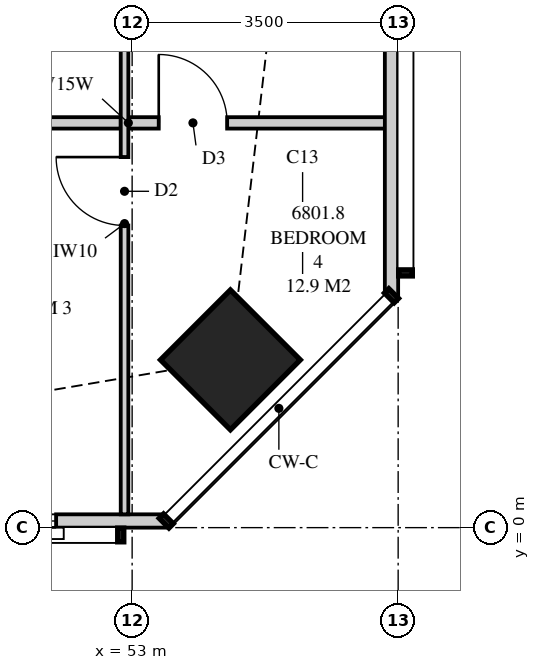
"""IFC4 building model, lengths in metres.
Left out: names, types, materials, properties, quantities, classifications, styles, units other than length and angle.
Written with IfcOpenShell. Run it as: python <this file> out.ifc"""

import sys

from ifc_helpers import new_model, si_unit, direction, frame, frame_2d, origin, origin_2d, place, context, subcontext, project, spatial, polyline, rectangle, outline, extrude, element, fill, save


model = new_model("IFC4")
c1 = context("Model", 3, precision=1e-05, world=origin(), true_north=direction((0.0, 1.0)))
c2 = subcontext(c1, "Body", "Model", "MODEL_VIEW")
j1 = project(units=[si_unit("LENGTHUNIT", "METRE"), si_unit("PLANEANGLEUNIT", "RADIAN")], contexts=[c1])
p1 = place(None, origin())
s1 = spatial("IfcSite", under=j1, at=p1, CompositionType="ELEMENT")
p2 = place(p1, origin())
s2 = spatial("IfcBuilding", under=s1, at=p2, CompositionType="ELEMENT")
p3 = place(p2, frame((0.0, 0.0, 249.45)))
s3 = spatial("IfcBuildingStorey", under=s2, at=p3, CompositionType="ELEMENT", Elevation=249.45)
p4 = place(p3, frame((54.293, 2.207, 0.0), z_axis=(0.0, 0.0, 1.0), x_axis=(0.707106781187, 0.707106781187, 0.0)))
e1 = element("IfcColumn", 1, at=p4, inside=s3, PredefinedType="COLUMN", context=c2, shape_type="SweptSolid", body=[
    extrude(rectangle(XDim=1.3, YDim=1.3, at=origin_2d()), origin(), (0.0, 0.0, 1.0), 3.5),
])
p5 = place(p3, frame((19.851, 0.087, 0.0), z_axis=(0.0, 0.0, 1.0), x_axis=(1.0, 0.0, 0.0)))
e2 = element("IfcWall", 2, at=p5, inside=s3, PredefinedType="SOLIDWALL", context=c2, shape_type="SweptSolid", body=[
    extrude(outline(polyline([(0.0, 0.0), (33.597, 0.0), (33.597, 3.26), (27.239, 3.26), (27.239, 2.3), (27.155, 2.3), (27.155, 3.26), (27.024, 3.26), (27.024, 2.3), (7.774, 2.3), (7.774, 3.26), (7.642, 3.26), (7.642, 2.3), (7.559, 2.3), (7.559, 3.26), (0.0, 3.26), (0.0, 0.0)])), frame((0.0, 0.087, 0.0), z_axis=(0.0, -1.0, 0.0), x_axis=(1.0, 0.0, 0.0)), (0.0, 0.0, 1.0), 0.175),
])
p6 = place(p5, frame((2.649, 0.0, 0.4)))
e3 = element("IfcOpeningElement", 3, at=p6, cuts=e2, PredefinedType="OPENING", context=c2, shape_type="SweptSolid", body=[
    extrude(rectangle(XDim=1.8, YDim=1.85, at=frame_2d((0.9, 0.925))), frame((0.0, 0.097, 0.0), z_axis=(0.0, -1.0, 0.0), x_axis=(1.0, 0.0, 0.0)), (0.0, 0.0, 1.0), 0.195),
])
p7 = place(p5, frame((8.625, 0.0, 0.4)))
e4 = element("IfcOpeningElement", 4, at=p7, cuts=e2, PredefinedType="OPENING", context=c2, shape_type="SweptSolid", body=[
    extrude(rectangle(XDim=1.8, YDim=1.85, at=frame_2d((0.9, 0.925))), frame((0.0, 0.097, 0.0), z_axis=(0.0, -1.0, 0.0), x_axis=(1.0, 0.0, 0.0)), (0.0, 0.0, 1.0), 0.195),
])
p8 = place(p5, frame((11.499, 0.0, 0.4)))
e5 = element("IfcOpeningElement", 5, at=p8, cuts=e2, PredefinedType="OPENING", context=c2, shape_type="SweptSolid", body=[
    extrude(rectangle(XDim=1.8, YDim=1.85, at=frame_2d((0.9, 0.925))), frame((0.0, 0.097, 0.0), z_axis=(0.0, -1.0, 0.0), x_axis=(1.0, 0.0, 0.0)), (0.0, 0.0, 1.0), 0.195),
])
p9 = place(p5, frame((14.359, 0.0, 0.0)))
e6 = element("IfcOpeningElement", 6, at=p9, cuts=e2, PredefinedType="OPENING", context=c2, shape_type="SweptSolid", body=[
    extrude(rectangle(XDim=1.8, YDim=2.25, at=frame_2d((0.9, 1.125))), frame((0.0, 0.097, 0.0), z_axis=(0.0, -1.0, 0.0), x_axis=(1.0, 0.0, 0.0)), (0.0, 0.0, 1.0), 0.195),
])
p10 = place(p5, frame((19.299, 0.0, 0.4)))
e7 = element("IfcOpeningElement", 7, at=p10, cuts=e2, PredefinedType="OPENING", context=c2, shape_type="SweptSolid", body=[
    extrude(rectangle(XDim=1.8, YDim=1.85, at=frame_2d((0.9, 0.925))), frame((0.0, 0.097, 0.0), z_axis=(0.0, -1.0, 0.0), x_axis=(1.0, 0.0, 0.0)), (0.0, 0.0, 1.0), 0.195),
])
p11 = place(p5, frame((23.674, 0.0, 0.4)))
e8 = element("IfcOpeningElement", 8, at=p11, cuts=e2, PredefinedType="OPENING", context=c2, shape_type="SweptSolid", body=[
    extrude(rectangle(XDim=2.4, YDim=1.85, at=frame_2d((1.2, 0.925))), frame((0.0, 0.097, 0.0), z_axis=(0.0, -1.0, 0.0), x_axis=(1.0, 0.0, 0.0)), (0.0, 0.0, 1.0), 0.195),
])
p12 = place(p5, frame((30.349, 0.0, 0.4)))
e9 = element("IfcOpeningElement", 9, at=p12, cuts=e2, PredefinedType="OPENING", context=c2, shape_type="SweptSolid", body=[
    extrude(rectangle(XDim=1.8, YDim=1.85, at=frame_2d((0.9, 0.925))), frame((0.0, 0.097, 0.0), z_axis=(0.0, -1.0, 0.0), x_axis=(1.0, 0.0, 0.0)), (0.0, 0.0, 1.0), 0.195),
])
p13 = place(p3, frame((56.413, 3.051, 0.0), z_axis=(0.0, 0.0, 1.0), x_axis=(0.0, 1.0, 0.0)))
e10 = element("IfcWall", 10, at=p13, inside=s3, PredefinedType="SOLIDWALL", context=c2, shape_type="SweptSolid", body=[
    extrude(outline(polyline([(0.0, 0.0), (27.897, 0.0), (27.897, 3.26), (22.157, 3.26), (22.157, 2.3), (22.092, 2.3), (22.092, 3.26), (21.949, 3.26), (21.949, 2.3), (9.949, 2.3), (9.949, 3.26), (9.858, 3.26), (9.858, 2.3), (9.688, 2.3), (9.688, 3.26), (0.0, 3.26), (0.0, 0.0)])), frame((0.0, 0.087, 0.0), z_axis=(0.0, -1.0, 0.0), x_axis=(1.0, 0.0, 0.0)), (0.0, 0.0, 1.0), 0.175),
])
p14 = place(p13, frame((10.831, 0.0, 0.4)))
e11 = element("IfcOpeningElement", 11, at=p14, cuts=e10, PredefinedType="OPENING", context=c2, shape_type="SweptSolid", body=[
    extrude(rectangle(XDim=2.4, YDim=1.85, at=frame_2d((1.2, 0.925))), frame((0.0, 0.097, 0.0), z_axis=(0.0, -1.0, 0.0), x_axis=(1.0, 0.0, 0.0)), (0.0, 0.0, 1.0), 0.195),
])
p15 = place(p13, frame((15.074, 0.0, 0.0)))
e12 = element("IfcOpeningElement", 12, at=p15, cuts=e10, PredefinedType="OPENING", context=c2, shape_type="SweptSolid", body=[
    extrude(rectangle(XDim=1.8, YDim=2.25, at=frame_2d((0.9, 1.125))), frame((0.0, 0.097, 0.0), z_axis=(0.0, -1.0, 0.0), x_axis=(1.0, 0.0, 0.0)), (0.0, 0.0, 1.0), 0.195),
])
p16 = place(p13, frame((18.699, 0.0, 0.4)))
e13 = element("IfcOpeningElement", 13, at=p16, cuts=e10, PredefinedType="OPENING", context=c2, shape_type="SweptSolid", body=[
    extrude(rectangle(XDim=2.4, YDim=1.85, at=frame_2d((1.2, 0.925))), frame((0.0, 0.097, 0.0), z_axis=(0.0, -1.0, 0.0), x_axis=(1.0, 0.0, 0.0)), (0.0, 0.0, 1.0), 0.195),
])
p17 = place(p3, frame((52.9, 0.175, 0.0), z_axis=(0.0, 0.0, 1.0), x_axis=(0.0, 1.0, 0.0)))
e14 = element("IfcWall", 14, at=p17, inside=s3, PredefinedType="PARTITIONING", context=c2, shape_type="SweptSolid", body=[
    extrude(outline(polyline([(0.0, 0.0), (7.65, 0.0), (7.65, 3.26), (2.668, 3.26), (2.668, 2.3), (0.924, 2.3), (0.924, 3.26), (0.0, 3.26), (0.0, 0.0)])), frame((0.0, 0.05, 0.0), z_axis=(0.0, -1.0, 0.0), x_axis=(1.0, 0.0, 0.0)), (0.0, 0.0, 1.0), 0.1),
])
p18 = place(p17, frame((3.8, 0.0, 0.0)))
e15 = element("IfcOpeningElement", 15, at=p18, cuts=e14, PredefinedType="OPENING", context=c2, shape_type="SweptSolid", body=[
    extrude(rectangle(XDim=0.9, YDim=2.1, at=frame_2d((0.45, 1.05))), frame((0.0, 0.06, 0.0), z_axis=(0.0, -1.0, 0.0), x_axis=(1.0, 0.0, 0.0)), (0.0, 0.0, 1.0), 0.12),
])
p19 = place(p3, frame((49.35, 5.325, 0.0), z_axis=(0.0, 0.0, 1.0), x_axis=(1.0, 0.0, 0.0)))
e16 = element("IfcWall", 16, at=p19, inside=s3, PredefinedType="PLUMBINGWALL", context=c2, shape_type="SweptSolid", body=[
    extrude(rectangle(XDim=3.5, YDim=0.15, at=frame_2d((1.75, 0.0))), origin(), (0.0, 0.0, 1.0), 3.26),
])
p20 = place(p3, frame((52.95, 5.325, 0.0), z_axis=(0.0, 0.0, 1.0), x_axis=(1.0, 0.0, 0.0)))
e17 = element("IfcWall", 17, at=p20, inside=s3, PredefinedType="PLUMBINGWALL", context=c2, shape_type="SweptSolid", body=[
    extrude(outline(polyline([(0.0, 0.0), (3.55, 0.0), (3.55, 3.26), (2.597, 3.26), (2.597, 2.3), (0.815, 2.3), (0.815, 3.26), (0.0, 3.26), (0.0, 0.0)])), frame((0.0, 0.075, 0.0), z_axis=(0.0, -1.0, 0.0), x_axis=(1.0, 0.0, 0.0)), (0.0, 0.0, 1.0), 0.15),
])
p21 = place(p20, frame((0.4, 0.0, 0.0)))
e18 = element("IfcOpeningElement", 18, at=p21, cuts=e17, PredefinedType="OPENING", context=c2, shape_type="SweptSolid", body=[
    extrude(rectangle(XDim=0.9, YDim=2.1, at=frame_2d((0.45, 1.05))), frame((0.0, 0.085, 0.0), z_axis=(0.0, -1.0, 0.0), x_axis=(1.0, 0.0, 0.0)), (0.0, 0.0, 1.0), 0.17),
])
p22 = place(p12, origin())
e19 = element("IfcWindow", 19, at=p22, inside=s3, PartitioningType="SINGLE_PANEL", PredefinedType="WINDOW", context=c2, shape_type="SweptSolid", body=[
    extrude(rectangle(XDim=1.8, YDim=1.85, at=frame_2d((0.9, 0.925))), frame((0.0, 0.03, 0.0), z_axis=(0.0, -1.0, 0.0), x_axis=(1.0, 0.0, 0.0)), (0.0, 0.0, 1.0), 0.06),
])
fill(e9, e19)
p23 = place(p18, origin())
e20 = element("IfcDoor", 20, at=p23, inside=s3, OperationType="SINGLE_SWING_RIGHT", PredefinedType="DOOR", context=c2, shape_type="SweptSolid", body=[
    extrude(rectangle(XDim=0.9, YDim=2.1, at=frame_2d((0.45, 1.05))), frame((0.0, 0.025, 0.0), z_axis=(0.0, -1.0, 0.0), x_axis=(1.0, 0.0, 0.0)), (0.0, 0.0, 1.0), 0.05),
])
fill(e15, e20)
p24 = place(p21, origin())
e21 = element("IfcDoor", 21, at=p24, inside=s3, OperationType="SINGLE_SWING_LEFT", PredefinedType="DOOR", context=c2, shape_type="SweptSolid", body=[
    extrude(rectangle(XDim=0.9, YDim=2.1, at=frame_2d((0.45, 1.05))), frame((0.0, 0.025, 0.0), z_axis=(0.0, -1.0, 0.0), x_axis=(1.0, 0.0, 0.0)), (0.0, 0.0, 1.0), 0.05),
])
fill(e18, e21)
save(model, sys.argv[1])
